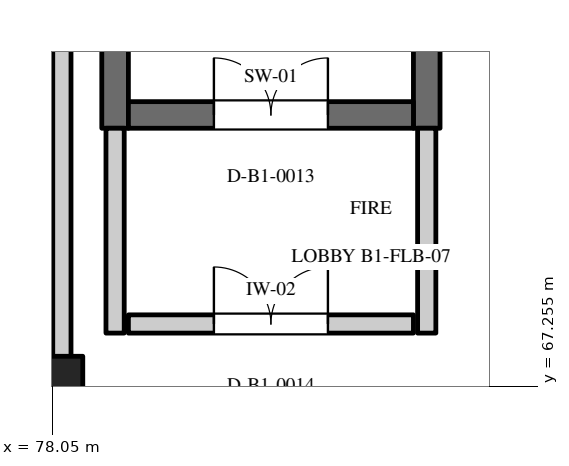
"""IFC4 building model, lengths in metres.
Left out: names, types, materials, properties, quantities, classifications, styles, units other than length and angle.
Written with IfcOpenShell. Run it as: python <this file> out.ifc"""

import sys

from ifc_helpers import new_model, si_unit, direction, frame, frame_2d, origin, origin_2d, place, context, subcontext, project, spatial, rectangle, extrude, element, fill, save


model = new_model("IFC4")
c1 = context("Model", 3, precision=1e-05, world=origin(), true_north=direction((0.0, 1.0)))
c2 = subcontext(c1, "Body", "Model", "MODEL_VIEW")
j1 = project(units=[si_unit("LENGTHUNIT", "METRE"), si_unit("PLANEANGLEUNIT", "RADIAN")], contexts=[c1])
p1 = place(None, origin())
s1 = spatial("IfcSite", under=j1, at=p1, CompositionType="ELEMENT")
p2 = place(p1, origin())
s2 = spatial("IfcBuilding", under=s1, at=p2, CompositionType="ELEMENT")
p3 = place(p2, frame((0.0, 0.0, -4.5)))
s3 = spatial("IfcBuildingStorey", under=s2, at=p3, CompositionType="ELEMENT", Elevation=-4.5)
p4 = place(p3, frame((78.0, 67.2, 0.0), z_axis=(0.0, 0.0, 1.0), x_axis=(1.0, 0.0, 0.0)))
e1 = element("IfcColumn", 1, at=p4, inside=s3, PredefinedType="COLUMN", context=c2, shape_type="SweptSolid", body=[
    extrude(rectangle(XDim=0.9, YDim=0.9, at=origin_2d()), origin(), (0.0, 0.0, 1.0), 4.5),
])
for number, where, z_axis, x_axis in (
    (2, (78.875, 70.65, 0.0), (0.0, 0.0, 1.0), (0.0, 1.0, 0.0)),
    (3, (82.975, 70.65, 0.0), (0.0, 0.0, 1.0), (0.0, 1.0, 0.0)),
):
    element("IfcWall", number, at=place(p3, frame(where, z_axis=z_axis, x_axis=x_axis)), inside=s3, PredefinedType="SHEAR", context=c2, shape_type="SweptSolid", body=[
        extrude(rectangle(XDim=10.5, YDim=0.35, at=frame_2d((5.25, 0.0))), origin(), (0.0, 0.0, 1.0), 4.5),
    ])
p5 = place(p3, frame((79.05, 70.825, 0.0), z_axis=(0.0, 0.0, 1.0), x_axis=(1.0, 0.0, 0.0)))
e4 = element("IfcWall", 4, at=p5, inside=s3, PredefinedType="SHEAR", context=c2, shape_type="SweptSolid", body=[
    extrude(rectangle(XDim=3.75, YDim=0.35, at=frame_2d((1.875, 0.0))), origin(), (0.0, 0.0, 1.0), 4.15),
])
p6 = place(p5, frame((1.125, 0.0, 0.0)))
e5 = element("IfcOpeningElement", 5, at=p6, cuts=e4, PredefinedType="OPENING", context=c2, shape_type="SweptSolid", body=[
    extrude(rectangle(XDim=1.5, YDim=2.2, at=frame_2d((0.75, 1.1))), frame((0.0, 0.187, 0.0), z_axis=(0.0, -1.0, 0.0), x_axis=(1.0, 0.0, 0.0)), (0.0, 0.0, 1.0), 0.374),
])
for number, where, z_axis, x_axis in (
    (6, (78.875, 67.955, 0.0), (0.0, 0.0, 1.0), (0.0, 1.0, 0.0)),
    (7, (82.975, 67.955, 0.0), (0.0, 0.0, 1.0), (0.0, 1.0, 0.0)),
):
    element("IfcWall", number, at=place(p3, frame(where, z_axis=z_axis, x_axis=x_axis)), inside=s3, PredefinedType="STANDARD", context=c2, shape_type="SweptSolid", body=[
        extrude(rectangle(XDim=2.695, YDim=0.24, at=frame_2d((1.347, 0.0))), origin(), (0.0, 0.0, 1.0), 4.15),
    ])
p7 = place(p3, frame((79.05, 68.075, 0.0), z_axis=(0.0, 0.0, 1.0), x_axis=(1.0, 0.0, 0.0)))
e8 = element("IfcWall", 8, at=p7, inside=s3, PredefinedType="STANDARD", context=c2, shape_type="SweptSolid", body=[
    extrude(rectangle(XDim=3.75, YDim=0.24, at=frame_2d((1.875, 0.0))), origin(), (0.0, 0.0, 1.0), 4.15),
])
p8 = place(p7, frame((1.125, 0.0, 0.0)))
e9 = element("IfcOpeningElement", 9, at=p8, cuts=e8, PredefinedType="OPENING", context=c2, shape_type="SweptSolid", body=[
    extrude(rectangle(XDim=1.5, YDim=2.2, at=frame_2d((0.75, 1.1))), frame((0.0, 0.132, 0.0), z_axis=(0.0, -1.0, 0.0), x_axis=(1.0, 0.0, 0.0)), (0.0, 0.0, 1.0), 0.264),
])
p9 = place(p3, frame((78.175, 54.11, 0.0), z_axis=(0.0, 0.0, 1.0), x_axis=(0.0, 1.0, 0.0)))
e10 = element("IfcWall", 10, at=p9, inside=s3, PredefinedType="STANDARD", context=c2, shape_type="SweptSolid", body=[
    extrude(rectangle(XDim=34.38, YDim=0.24, at=frame_2d((17.19, 0.0))), origin(), (0.0, 0.0, 1.0), 3.4),
])
p10 = place(p6, origin())
e11 = element("IfcDoor", 11, at=p10, inside=s3, OperationType="DOUBLE_DOOR_SINGLE_SWING", PredefinedType="DOOR", context=c2, shape_type="SweptSolid", body=[
    extrude(rectangle(XDim=1.5, YDim=2.2, at=frame_2d((0.75, 1.1))), frame((0.0, 0.025, 0.0), z_axis=(0.0, -1.0, 0.0), x_axis=(1.0, 0.0, 0.0)), (0.0, 0.0, 1.0), 0.05),
])
fill(e5, e11)
p11 = place(p8, origin())
e12 = element("IfcDoor", 12, at=p11, inside=s3, OperationType="DOUBLE_DOOR_SINGLE_SWING", PredefinedType="DOOR", context=c2, shape_type="SweptSolid", body=[
    extrude(rectangle(XDim=1.5, YDim=2.2, at=frame_2d((0.75, 1.1))), frame((0.0, 0.025, 0.0), z_axis=(0.0, -1.0, 0.0), x_axis=(1.0, 0.0, 0.0)), (0.0, 0.0, 1.0), 0.05),
])
fill(e9, e12)
save(model, sys.argv[1])
